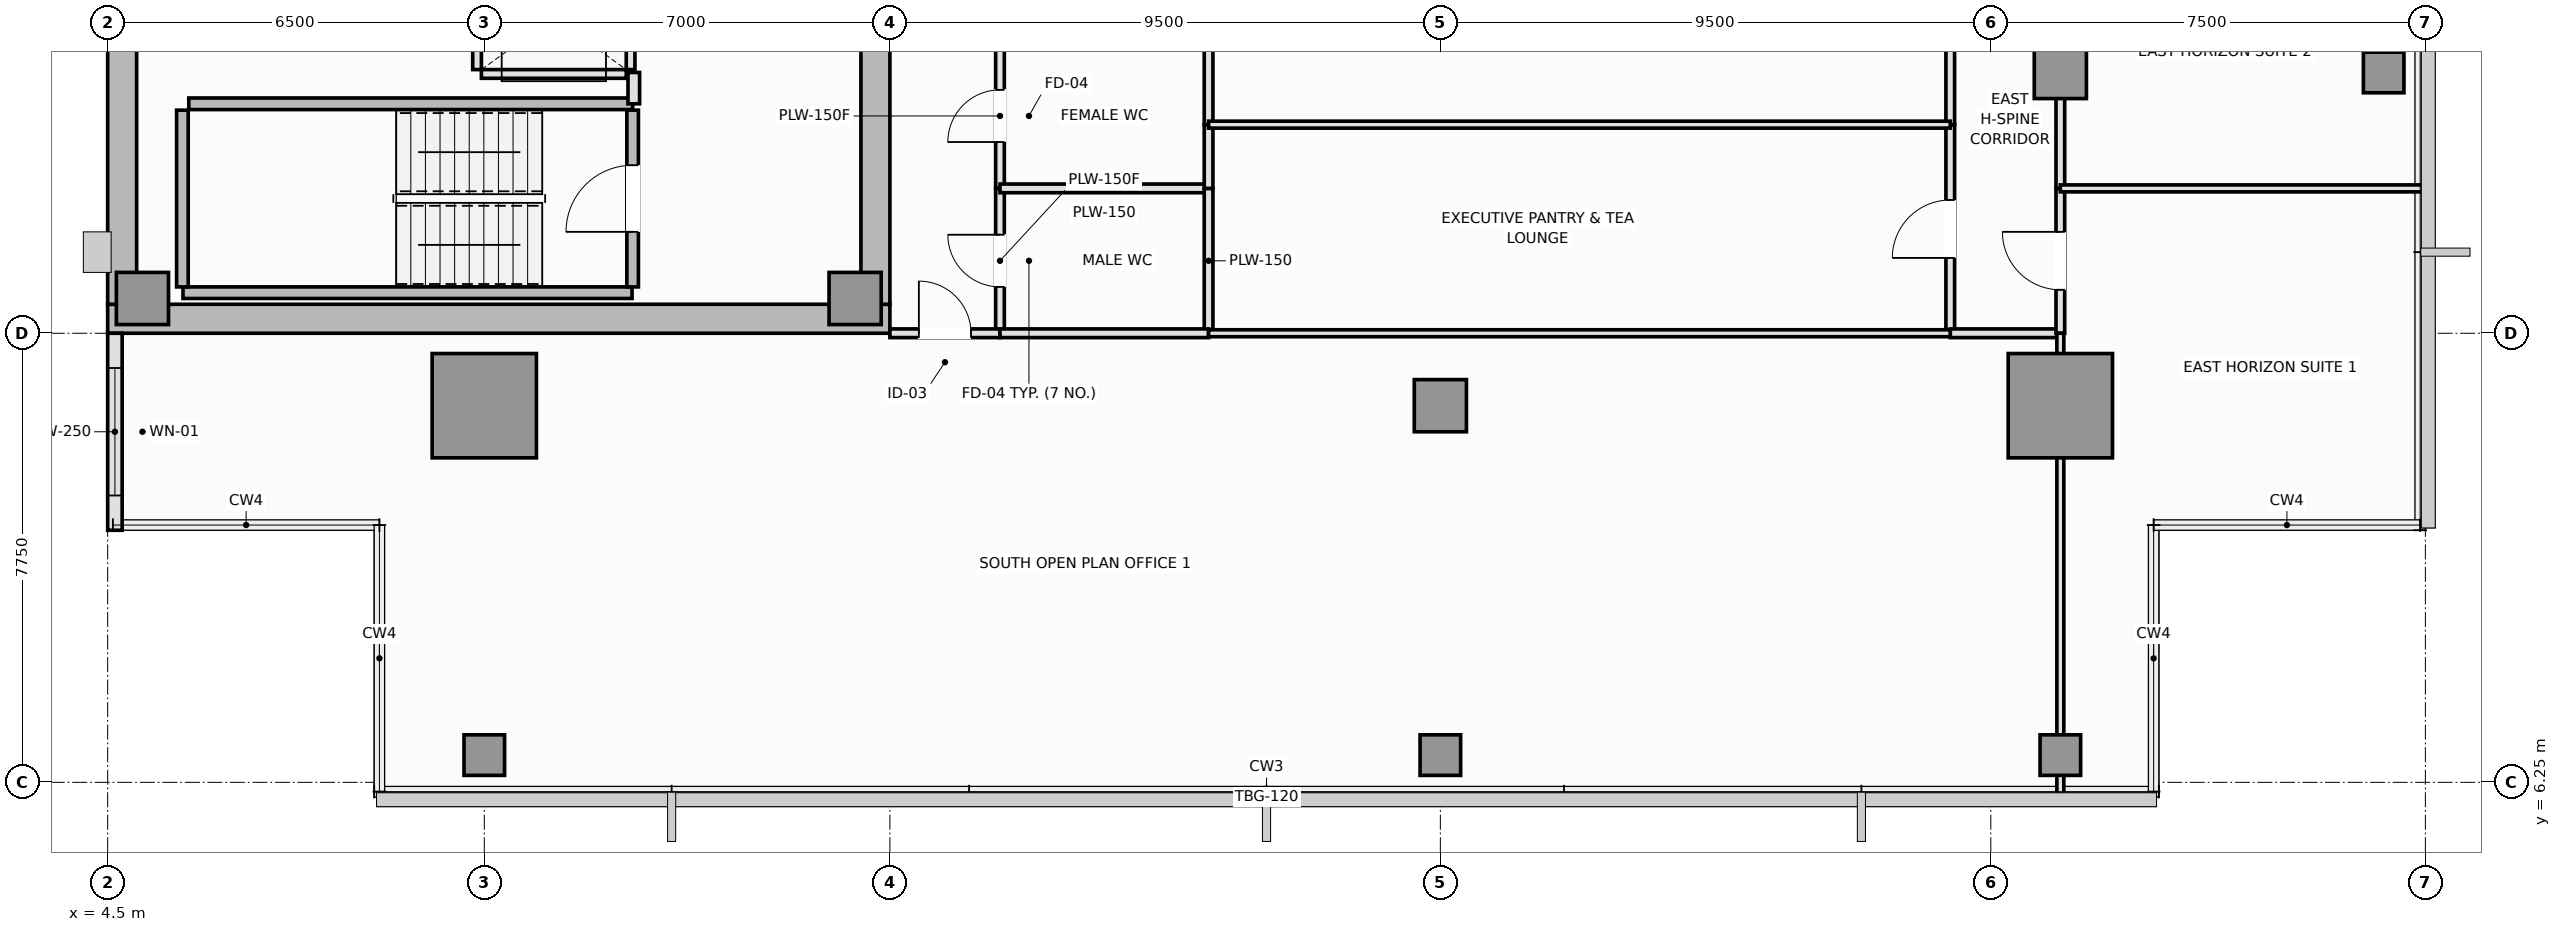
"""IFC4 building model, lengths in metres.
Left out: names, types, materials, properties, quantities, classifications, styles, units other than length and angle.
Written with IfcOpenShell. Run it as: python <this file> out.ifc"""

import sys

from ifc_helpers import new_model, si_unit, direction, frame, frame_2d, origin, origin_2d, place, context, subcontext, project, spatial, rectangle, extrude, element, fill, save


model = new_model("IFC4")
c1 = context("Model", 3, precision=1e-05, world=origin(), true_north=direction((0.0, 1.0)))
c2 = subcontext(c1, "Body", "Model", "MODEL_VIEW")
j1 = project(units=[si_unit("LENGTHUNIT", "METRE"), si_unit("PLANEANGLEUNIT", "RADIAN")], contexts=[c1])
p1 = place(None, origin())
s1 = spatial("IfcSite", under=j1, at=p1, CompositionType="ELEMENT")
p2 = place(p1, origin())
s2 = spatial("IfcBuilding", under=s1, at=p2, CompositionType="ELEMENT")
p3 = place(p2, frame((0.0, 0.0, 281.2)))
s3 = spatial("IfcBuildingStorey", under=s2, at=p3, CompositionType="ELEMENT", Elevation=281.2)
p4 = place(p3, frame((4.5, 14.25, 0.0), z_axis=(0.0, 0.0, 1.0), x_axis=(1.0, 0.0, 0.0)))
e1 = element("IfcWall", 1, at=p4, inside=s3, PredefinedType="SHEAR", context=c2, shape_type="SweptSolid", body=[
    extrude(rectangle(XDim=13.5, YDim=0.5, at=frame_2d((6.75, 0.0))), origin(), (0.0, 0.0, 1.0), 3.55),
])
p5 = place(p3, frame((4.75, 14.5, 0.0), z_axis=(0.0, 0.0, 1.0), x_axis=(0.0, 1.0, 0.0)))
e2 = element("IfcWall", 2, at=p5, inside=s3, PredefinedType="SHEAR", context=c2, shape_type="SweptSolid", body=[
    extrude(rectangle(XDim=21.5, YDim=0.5, at=frame_2d((10.75, 0.0))), origin(), (0.0, 0.0, 1.0), 3.55),
])
p6 = place(p3, frame((17.75, 14.5, 0.0), z_axis=(0.0, 0.0, 1.0), x_axis=(0.0, 1.0, 0.0)))
e3 = element("IfcWall", 3, at=p6, inside=s3, PredefinedType="SHEAR", context=c2, shape_type="SweptSolid", body=[
    extrude(rectangle(XDim=8.95, YDim=0.5, at=frame_2d((4.475, 0.0))), origin(), (0.0, 0.0, 1.0), 3.55),
])
p7 = place(p6, frame((4.4, 0.0, 0.0)))
e4 = element("IfcOpeningElement", 4, at=p7, cuts=e3, PredefinedType="OPENING", context=c2, shape_type="SweptSolid", body=[
    extrude(rectangle(XDim=1.1, YDim=2.15, at=frame_2d((0.55, 1.075))), frame((0.0, 0.26, 0.0), z_axis=(0.0, -1.0, 0.0), x_axis=(1.0, 0.0, 0.0)), (0.0, 0.0, 1.0), 0.52),
])
for number, where, z_axis, x_axis in (
    (5, (5.1, 14.6, 0.0), (0.0, 0.0, 1.0), (1.0, 0.0, 0.0)),
    (6, (17.4, 14.6, 0.0), (0.0, 0.0, 1.0), (1.0, 0.0, 0.0)),
):
    element("IfcColumn", number, at=place(p3, frame(where, z_axis=z_axis, x_axis=x_axis)), inside=s3, PredefinedType="PILASTER", context=c2, shape_type="SweptSolid", body=[
        extrude(rectangle(XDim=0.9, YDim=0.9, at=origin_2d()), origin(), (0.0, 0.0, 1.0), 3.55),
    ])
for number, where, z_axis, x_axis in (
    (7, (11.0, 12.75, 0.0), (0.0, 0.0, 1.0), (1.0, 0.0, 0.0)),
    (8, (38.2, 12.75, 0.0), (0.0, 0.0, 1.0), (1.0, 0.0, 0.0)),
):
    element("IfcColumn", number, at=place(p3, frame(where, z_axis=z_axis, x_axis=x_axis)), inside=s3, PredefinedType="COLUMN", context=c2, shape_type="SweptSolid", body=[
        extrude(rectangle(XDim=1.8, YDim=1.8, at=origin_2d()), origin(), (0.0, 0.0, 1.0), 3.55),
    ])
for number, where, z_axis, x_axis in (
    (9, (27.5, 12.75, 0.0), (0.0, 0.0, 1.0), (1.0, 0.0, 0.0)),
    (10, (38.2, 18.5, 0.0), (0.0, 0.0, 1.0), (1.0, 0.0, 0.0)),
):
    element("IfcColumn", number, at=place(p3, frame(where, z_axis=z_axis, x_axis=x_axis)), inside=s3, PredefinedType="COLUMN", context=c2, shape_type="SweptSolid", body=[
        extrude(rectangle(XDim=0.9, YDim=0.9, at=origin_2d()), origin(), (0.0, 0.0, 1.0), 3.55),
    ])
for number, where, z_axis, x_axis in (
    (11, (43.78, 18.5, 0.0), (0.0, 0.0, 1.0), (1.0, 0.0, 0.0)),
    (12, (11.0, 6.72, 0.0), (0.0, 0.0, 1.0), (1.0, 0.0, 0.0)),
    (13, (27.5, 6.72, 0.0), (0.0, 0.0, 1.0), (1.0, 0.0, 0.0)),
    (14, (38.2, 6.72, 0.0), (0.0, 0.0, 1.0), (1.0, 0.0, 0.0)),
):
    element("IfcColumn", number, at=place(p3, frame(where, z_axis=z_axis, x_axis=x_axis)), inside=s3, PredefinedType="COLUMN", context=c2, shape_type="SweptSolid", body=[
        extrude(rectangle(XDim=0.7, YDim=0.7, at=origin_2d()), origin(), (0.0, 0.0, 1.0), 3.55),
    ])
p8 = place(p3, frame((4.625, 14.0, 0.0), z_axis=(0.0, 0.0, 1.0), x_axis=(0.0, -1.0, 0.0)))
e15 = element("IfcWall", 15, at=p8, inside=s3, PredefinedType="SOLIDWALL", context=c2, shape_type="SweptSolid", body=[
    extrude(rectangle(XDim=3.4, YDim=0.25, at=frame_2d((1.7, 0.0))), origin(), (0.0, 0.0, 1.0), 3.39),
])
p9 = place(p8, frame((0.6, 0.0, 0.9)))
e16 = element("IfcOpeningElement", 16, at=p9, cuts=e15, PredefinedType="OPENING", context=c2, shape_type="SweptSolid", body=[
    extrude(rectangle(XDim=2.2, YDim=1.8, at=frame_2d((1.1, 0.9))), frame((0.0, 0.135, 0.0), z_axis=(0.0, -1.0, 0.0), x_axis=(1.0, 0.0, 0.0)), (0.0, 0.0, 1.0), 0.27),
])
p10 = place(p3, frame((5.8, 14.7, 0.0), z_axis=(0.0, 0.0, 1.0), x_axis=(1.0, 0.0, 0.0)))
e17 = element("IfcWall", 17, at=p10, inside=s3, PredefinedType="SOLIDWALL", context=c2, shape_type="SweptSolid", body=[
    extrude(rectangle(XDim=7.75, YDim=0.2, at=frame_2d((3.875, 0.0))), origin(), (0.0, 0.0, 1.0), 3.55),
])
p11 = place(p3, frame((5.79, 14.8, 0.0), z_axis=(0.0, 0.0, 1.0), x_axis=(0.0, 1.0, 0.0)))
e18 = element("IfcWall", 18, at=p11, inside=s3, PredefinedType="SOLIDWALL", context=c2, shape_type="SweptSolid", body=[
    extrude(rectangle(XDim=3.05, YDim=0.2, at=frame_2d((1.525, 0.0))), origin(), (0.0, 0.0, 1.0), 3.55),
])
p12 = place(p3, frame((5.9, 17.96, 0.0), z_axis=(0.0, 0.0, 1.0), x_axis=(1.0, 0.0, 0.0)))
e19 = element("IfcWall", 19, at=p12, inside=s3, PredefinedType="SOLIDWALL", context=c2, shape_type="SweptSolid", body=[
    extrude(rectangle(XDim=7.66, YDim=0.2, at=frame_2d((3.83, 0.0))), origin(), (0.0, 0.0, 1.0), 3.55),
])
p13 = place(p3, frame((13.56, 14.8, 0.0), z_axis=(0.0, 0.0, 1.0), x_axis=(0.0, 1.0, 0.0)))
e20 = element("IfcWall", 20, at=p13, inside=s3, PredefinedType="SOLIDWALL", context=c2, shape_type="SweptSolid", body=[
    extrude(rectangle(XDim=3.05, YDim=0.2, at=frame_2d((1.525, 0.0))), origin(), (0.0, 0.0, 1.0), 3.55),
])
p14 = place(p13, frame((0.95, 0.0, 0.0)))
e21 = element("IfcOpeningElement", 21, at=p14, cuts=e20, PredefinedType="OPENING", context=c2, shape_type="SweptSolid", body=[
    extrude(rectangle(XDim=1.15, YDim=2.15, at=frame_2d((0.575, 1.075))), frame((0.0, 0.11, 0.0), z_axis=(0.0, -1.0, 0.0), x_axis=(1.0, 0.0, 0.0)), (0.0, 0.0, 1.0), 0.22),
])
p15 = place(p3, frame((10.95, 18.475, 0.0), z_axis=(0.0, 0.0, 1.0), x_axis=(1.0, 0.0, 0.0)))
e22 = element("IfcWall", 22, at=p15, inside=s3, PredefinedType="PARTITIONING", context=c2, shape_type="SweptSolid", body=[
    extrude(rectangle(XDim=2.5, YDim=0.15, at=frame_2d((1.25, 0.0))), origin(), (0.0, 0.0, 1.0), 3.39),
])
p16 = place(p3, frame((10.875, 18.55, 0.0), z_axis=(0.0, 0.0, 1.0), x_axis=(0.0, 1.0, 0.0)))
e23 = element("IfcWall", 23, at=p16, inside=s3, PredefinedType="PARTITIONING", context=c2, shape_type="SweptSolid", body=[
    extrude(rectangle(XDim=1.8, YDim=0.15, at=frame_2d((0.9, 0.0))), origin(), (0.0, 0.0, 1.0), 3.39),
])
p17 = place(p3, frame((13.525, 18.55, 0.0), z_axis=(0.0, 0.0, 1.0), x_axis=(0.0, 1.0, 0.0)))
e24 = element("IfcWall", 24, at=p17, inside=s3, PredefinedType="PARTITIONING", context=c2, shape_type="SweptSolid", body=[
    extrude(rectangle(XDim=1.8, YDim=0.15, at=frame_2d((0.9, 0.0))), origin(), (0.0, 0.0, 1.0), 3.39),
])
p18 = place(p17, frame((0.35, 0.0, 0.0)))
e25 = element("IfcOpeningElement", 25, at=p18, cuts=e24, PredefinedType="OPENING", context=c2, shape_type="SweptSolid", body=[
    extrude(rectangle(XDim=1.1, YDim=2.2, at=frame_2d((0.55, 1.1))), frame((0.0, 0.085, 0.0), z_axis=(0.0, -1.0, 0.0), x_axis=(1.0, 0.0, 0.0)), (0.0, 0.0, 1.0), 0.17),
])
p19 = place(p3, frame((13.58, 17.96, 0.0), z_axis=(0.0, 0.0, 1.0), x_axis=(0.0, 1.0, 0.0)))
e26 = element("IfcWall", 26, at=p19, inside=s3, PredefinedType="PARTITIONING", context=c2, shape_type="SweptSolid", body=[
    extrude(rectangle(XDim=0.54, YDim=0.2, at=frame_2d((0.27, 0.0))), origin(), (0.0, 0.0, 1.0), 3.39),
])
p20 = place(p3, frame((19.9, 14.0, 0.0), z_axis=(0.0, 0.0, 1.0), x_axis=(0.0, 1.0, 0.0)))
e27 = element("IfcWall", 27, at=p20, inside=s3, PredefinedType="PLUMBINGWALL", context=c2, shape_type="SweptSolid", body=[
    extrude(rectangle(XDim=2.5, YDim=0.15, at=frame_2d((1.25, 0.0))), origin(), (0.0, 0.0, 1.0), 3.39),
])
p21 = place(p20, frame((0.8, 0.0, 0.0)))
e28 = element("IfcOpeningElement", 28, at=p21, cuts=e27, PredefinedType="OPENING", context=c2, shape_type="SweptSolid", body=[
    extrude(rectangle(XDim=0.9, YDim=2.1, at=frame_2d((0.45, 1.05))), frame((0.0, 0.085, 0.0), z_axis=(0.0, -1.0, 0.0), x_axis=(1.0, 0.0, 0.0)), (0.0, 0.0, 1.0), 0.17),
])
p22 = place(p3, frame((19.9, 16.5, 0.0), z_axis=(0.0, 0.0, 1.0), x_axis=(0.0, 1.0, 0.0)))
e29 = element("IfcWall", 29, at=p22, inside=s3, PredefinedType="PLUMBINGWALL", context=c2, shape_type="SweptSolid", body=[
    extrude(rectangle(XDim=2.5, YDim=0.15, at=frame_2d((1.25, 0.0))), origin(), (0.0, 0.0, 1.0), 3.39),
])
p23 = place(p22, frame((0.8, 0.0, 0.0)))
e30 = element("IfcOpeningElement", 30, at=p23, cuts=e29, PredefinedType="OPENING", context=c2, shape_type="SweptSolid", body=[
    extrude(rectangle(XDim=0.9, YDim=2.1, at=frame_2d((0.45, 1.05))), frame((0.0, 0.085, 0.0), z_axis=(0.0, -1.0, 0.0), x_axis=(1.0, 0.0, 0.0)), (0.0, 0.0, 1.0), 0.17),
])
p24 = place(p3, frame((18.0, 14.0, 0.0), z_axis=(0.0, 0.0, 1.0), x_axis=(1.0, 0.0, 0.0)))
e31 = element("IfcWall", 31, at=p24, inside=s3, PredefinedType="PARTITIONING", context=c2, shape_type="SweptSolid", body=[
    extrude(rectangle(XDim=1.9, YDim=0.15, at=frame_2d((0.95, 0.0))), origin(), (0.0, 0.0, 1.0), 3.39),
])
p25 = place(p24, frame((0.5, 0.0, 0.0)))
e32 = element("IfcOpeningElement", 32, at=p25, cuts=e31, PredefinedType="OPENING", context=c2, shape_type="SweptSolid", body=[
    extrude(rectangle(XDim=0.9, YDim=2.1, at=frame_2d((0.45, 1.05))), frame((0.0, 0.085, 0.0), z_axis=(0.0, -1.0, 0.0), x_axis=(1.0, 0.0, 0.0)), (0.0, 0.0, 1.0), 0.17),
])
p26 = place(p3, frame((36.3, 14.0, 0.0), z_axis=(0.0, 0.0, 1.0), x_axis=(0.0, 1.0, 0.0)))
e33 = element("IfcWall", 33, at=p26, inside=s3, PredefinedType="PARTITIONING", context=c2, shape_type="SweptSolid", body=[
    extrude(rectangle(XDim=3.6, YDim=0.15, at=frame_2d((1.8, 0.0))), origin(), (0.0, 0.0, 1.0), 3.39),
])
p27 = place(p26, frame((1.3, 0.0, 0.0)))
e34 = element("IfcOpeningElement", 34, at=p27, cuts=e33, PredefinedType="OPENING", context=c2, shape_type="SweptSolid", body=[
    extrude(rectangle(XDim=1.0, YDim=2.15, at=frame_2d((0.5, 1.075))), frame((0.0, 0.085, 0.0), z_axis=(0.0, -1.0, 0.0), x_axis=(1.0, 0.0, 0.0)), (0.0, 0.0, 1.0), 0.17),
])
p28 = place(p3, frame((36.3, 17.6, 0.0), z_axis=(0.0, 0.0, 1.0), x_axis=(0.0, 1.0, 0.0)))
e35 = element("IfcWall", 35, at=p28, inside=s3, PredefinedType="PARTITIONING", context=c2, shape_type="SweptSolid", body=[
    extrude(rectangle(XDim=10.2, YDim=0.15, at=frame_2d((5.1, 0.0))), origin(), (0.0, 0.0, 1.0), 3.39),
])
p29 = place(p3, frame((36.3, 14.0, 0.0), z_axis=(0.0, 0.0, 1.0), x_axis=(1.0, 0.0, 0.0)))
e36 = element("IfcWall", 36, at=p29, inside=s3, PredefinedType="PARTITIONING", context=c2, shape_type="SweptSolid", body=[
    extrude(rectangle(XDim=1.9, YDim=0.15, at=frame_2d((0.95, 0.0))), origin(), (0.0, 0.0, 1.0), 3.39),
])
p30 = place(p3, frame((38.2, 14.0, 0.0), z_axis=(0.0, 0.0, 1.0), x_axis=(0.0, 1.0, 0.0)))
e37 = element("IfcWall", 37, at=p30, inside=s3, PredefinedType="PARTITIONING", context=c2, shape_type="SweptSolid", body=[
    extrude(rectangle(XDim=2.5, YDim=0.15, at=frame_2d((1.25, 0.0))), origin(), (0.0, 0.0, 1.0), 2.99),
])
p31 = place(p30, frame((0.75, 0.0, 0.0)))
e38 = element("IfcOpeningElement", 38, at=p31, cuts=e37, PredefinedType="OPENING", context=c2, shape_type="SweptSolid", body=[
    extrude(rectangle(XDim=1.0, YDim=2.15, at=frame_2d((0.5, 1.075))), frame((0.0, 0.085, 0.0), z_axis=(0.0, -1.0, 0.0), x_axis=(1.0, 0.0, 0.0)), (0.0, 0.0, 1.0), 0.17),
])
p32 = place(p3, frame((38.2, 16.5, 0.0), z_axis=(0.0, 0.0, 1.0), x_axis=(0.0, 1.0, 0.0)))
e39 = element("IfcWall", 39, at=p32, inside=s3, PredefinedType="PARTITIONING", context=c2, shape_type="SweptSolid", body=[
    extrude(rectangle(XDim=4.5, YDim=0.15, at=frame_2d((2.25, 0.0))), origin(), (0.0, 0.0, 1.0), 2.99),
])
p33 = place(p32, frame((2.722, 0.0, 0.0)))
e40 = element("IfcOpeningElement", 40, at=p33, cuts=e39, PredefinedType="OPENING", context=c2, shape_type="SweptSolid", body=[
    extrude(rectangle(XDim=1.0, YDim=2.15, at=frame_2d((0.5, 1.075))), frame((0.0, 0.085, 0.0), z_axis=(0.0, -1.0, 0.0), x_axis=(1.0, 0.0, 0.0)), (0.0, 0.0, 1.0), 0.17),
])
p34 = place(p3, frame((19.9, 16.5, 0.0), z_axis=(0.0, 0.0, 1.0), x_axis=(1.0, 0.0, 0.0)))
e41 = element("IfcWall", 41, at=p34, inside=s3, PredefinedType="PLUMBINGWALL", context=c2, shape_type="SweptSolid", body=[
    extrude(rectangle(XDim=3.6, YDim=0.15, at=frame_2d((1.8, 0.0))), origin(), (0.0, 0.0, 1.0), 3.39),
])
p35 = place(p3, frame((23.5, 14.0, 0.0), z_axis=(0.0, 0.0, 1.0), x_axis=(0.0, 1.0, 0.0)))
e42 = element("IfcWall", 42, at=p35, inside=s3, PredefinedType="PLUMBINGWALL", context=c2, shape_type="SweptSolid", body=[
    extrude(rectangle(XDim=2.5, YDim=0.15, at=frame_2d((1.25, 0.0))), origin(), (0.0, 0.0, 1.0), 3.39),
])
p36 = place(p3, frame((19.9, 14.0, 0.0), z_axis=(0.0, 0.0, 1.0), x_axis=(1.0, 0.0, 0.0)))
e43 = element("IfcWall", 43, at=p36, inside=s3, PredefinedType="PLUMBINGWALL", context=c2, shape_type="SweptSolid", body=[
    extrude(rectangle(XDim=3.6, YDim=0.15, at=frame_2d((1.8, 0.0))), origin(), (0.0, 0.0, 1.0), 3.39),
])
p37 = place(p3, frame((23.5, 16.5, 0.0), z_axis=(0.0, 0.0, 1.0), x_axis=(0.0, 1.0, 0.0)))
e44 = element("IfcWall", 44, at=p37, inside=s3, PredefinedType="PLUMBINGWALL", context=c2, shape_type="SweptSolid", body=[
    extrude(rectangle(XDim=1.1, YDim=0.15, at=frame_2d((0.55, 0.0))), origin(), (0.0, 0.0, 1.0), 3.39),
])
p38 = place(p3, frame((23.5, 17.6, 0.0), z_axis=(0.0, 0.0, 1.0), x_axis=(0.0, 1.0, 0.0)))
e45 = element("IfcWall", 45, at=p38, inside=s3, PredefinedType="PLUMBINGWALL", context=c2, shape_type="SweptSolid", body=[
    extrude(rectangle(XDim=1.4, YDim=0.15, at=frame_2d((0.7, 0.0))), origin(), (0.0, 0.0, 1.0), 3.39),
])
for number, where, z_axis, x_axis in (
    (46, (23.5, 17.6, 0.0), (0.0, 0.0, 1.0), (1.0, 0.0, 0.0)),
    (47, (23.5, 14.0, 0.0), (0.0, 0.0, 1.0), (1.0, 0.0, 0.0)),
):
    element("IfcWall", number, at=place(p3, frame(where, z_axis=z_axis, x_axis=x_axis)), inside=s3, PredefinedType="PARTITIONING", context=c2, shape_type="SweptSolid", body=[
        extrude(rectangle(XDim=12.8, YDim=0.12, at=frame_2d((6.4, 0.0))), origin(), (0.0, 0.0, 1.0), 3.39),
    ])
p39 = place(p3, frame((38.2, 6.01, 0.0), z_axis=(0.0, 0.0, 1.0), x_axis=(0.0, 1.0, 0.0)))
e48 = element("IfcWall", 48, at=p39, inside=s3, PredefinedType="PARTITIONING", context=c2, shape_type="SweptSolid", body=[
    extrude(rectangle(XDim=7.99, YDim=0.12, at=frame_2d((3.995, 0.0))), origin(), (0.0, 0.0, 1.0), 2.99),
])
p40 = place(p3, frame((38.2, 16.5, 0.0), z_axis=(0.0, 0.0, 1.0), x_axis=(1.0, 0.0, 0.0)))
e49 = element("IfcWall", 49, at=p40, inside=s3, PredefinedType="PARTITIONING", context=c2, shape_type="SweptSolid", body=[
    extrude(rectangle(XDim=6.29, YDim=0.12, at=frame_2d((3.145, 0.0))), origin(), (0.0, 0.0, 1.0), 3.39),
])
p41 = place(p9, origin())
e50 = element("IfcWindow", 50, at=p41, inside=s3, PartitioningType="SINGLE_PANEL", PredefinedType="WINDOW", context=c2, shape_type="SweptSolid", body=[
    extrude(rectangle(XDim=2.2, YDim=1.8, at=frame_2d((1.1, 0.9))), frame((0.0, 0.03, 0.0), z_axis=(0.0, -1.0, 0.0), x_axis=(1.0, 0.0, 0.0)), (0.0, 0.0, 1.0), 0.06),
])
fill(e16, e50)
p42 = place(p14, origin())
e51 = element("IfcDoor", 51, at=p42, inside=s3, OperationType="SINGLE_SWING_LEFT", PredefinedType="DOOR", context=c2, shape_type="SweptSolid", body=[
    extrude(rectangle(XDim=1.15, YDim=2.15, at=frame_2d((0.575, 1.075))), frame((0.0, 0.025, 0.0), z_axis=(0.0, -1.0, 0.0), x_axis=(1.0, 0.0, 0.0)), (0.0, 0.0, 1.0), 0.05),
])
fill(e21, e51)
p43 = place(p21, origin())
e52 = element("IfcDoor", 52, at=p43, inside=s3, OperationType="SINGLE_SWING_RIGHT", PredefinedType="DOOR", context=c2, shape_type="SweptSolid", body=[
    extrude(rectangle(XDim=0.9, YDim=2.1, at=frame_2d((0.45, 1.05))), frame((0.0, 0.025, 0.0), z_axis=(0.0, -1.0, 0.0), x_axis=(1.0, 0.0, 0.0)), (0.0, 0.0, 1.0), 0.05),
])
fill(e28, e52)
p44 = place(p23, origin())
e53 = element("IfcDoor", 53, at=p44, inside=s3, OperationType="SINGLE_SWING_LEFT", PredefinedType="DOOR", context=c2, shape_type="SweptSolid", body=[
    extrude(rectangle(XDim=0.9, YDim=2.1, at=frame_2d((0.45, 1.05))), frame((0.0, 0.025, 0.0), z_axis=(0.0, -1.0, 0.0), x_axis=(1.0, 0.0, 0.0)), (0.0, 0.0, 1.0), 0.05),
])
fill(e30, e53)
p45 = place(p25, origin())
e54 = element("IfcDoor", 54, at=p45, inside=s3, OperationType="SINGLE_SWING_LEFT", PredefinedType="DOOR", context=c2, shape_type="SweptSolid", body=[
    extrude(rectangle(XDim=0.9, YDim=2.1, at=frame_2d((0.45, 1.05))), frame((0.0, 0.025, 0.0), z_axis=(0.0, -1.0, 0.0), x_axis=(1.0, 0.0, 0.0)), (0.0, 0.0, 1.0), 0.05),
])
fill(e32, e54)
p46 = place(p27, origin())
e55 = element("IfcDoor", 55, at=p46, inside=s3, OperationType="SINGLE_SWING_LEFT", PredefinedType="DOOR", context=c2, shape_type="SweptSolid", body=[
    extrude(rectangle(XDim=1.0, YDim=2.15, at=frame_2d((0.5, 1.075))), frame((0.0, 0.025, 0.0), z_axis=(0.0, -1.0, 0.0), x_axis=(1.0, 0.0, 0.0)), (0.0, 0.0, 1.0), 0.05),
])
fill(e34, e55)
p47 = place(p31, origin())
e56 = element("IfcDoor", 56, at=p47, inside=s3, OperationType="SINGLE_SWING_RIGHT", PredefinedType="DOOR", context=c2, shape_type="SweptSolid", body=[
    extrude(rectangle(XDim=1.0, YDim=2.15, at=frame_2d((0.5, 1.075))), frame((0.0, 0.025, 0.0), z_axis=(0.0, -1.0, 0.0), x_axis=(1.0, 0.0, 0.0)), (0.0, 0.0, 1.0), 0.05),
])
fill(e38, e56)
save(model, sys.argv[1])
